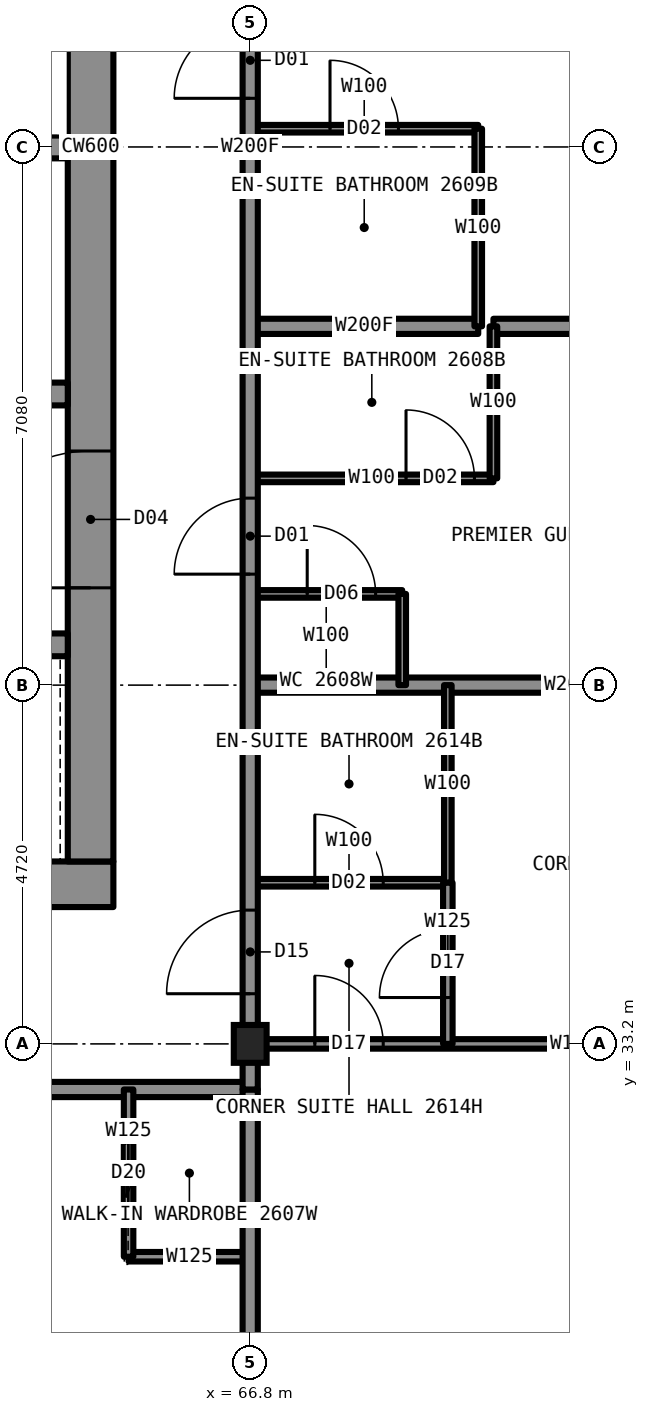
"""IFC4 building model, lengths in metres.
Left out: names, types, materials, properties, quantities, classifications, styles, units other than length and angle.
Written with IfcOpenShell. Run it as: python <this file> out.ifc"""

import sys

from ifc_helpers import new_model, si_unit, direction, frame, frame_2d, origin, origin_2d, place, context, subcontext, project, spatial, rectangle, i_section, extrude, element, fill, save


model = new_model("IFC4")
c1 = context("Model", 3, precision=1e-05, world=origin(), true_north=direction((0.0, 1.0)))
c2 = subcontext(c1, "Body", "Model", "MODEL_VIEW")
j1 = project(units=[si_unit("LENGTHUNIT", "METRE"), si_unit("PLANEANGLEUNIT", "RADIAN")], contexts=[c1])
p1 = place(None, origin())
s1 = spatial("IfcSite", under=j1, at=p1, CompositionType="ELEMENT")
p2 = place(p1, origin())
s2 = spatial("IfcBuilding", under=s1, at=p2, CompositionType="ELEMENT")
p3 = place(p2, frame((0.0, 0.0, 93.4)))
s3 = spatial("IfcBuildingStorey", under=s2, at=p3, CompositionType="ELEMENT", Elevation=93.4)
p4 = place(p3, frame((66.8, 33.2, 0.0), z_axis=(0.0, 0.0, 1.0), x_axis=(1.0, 0.0, 0.0)))
e1 = element("IfcColumn", 1, at=p4, inside=s3, PredefinedType="COLUMN", context=c2, shape_type="SweptSolid", body=[
    extrude(i_section(OverallWidth=0.432, OverallDepth=0.498, WebThickness=0.056, FlangeThickness=0.089, at=origin_2d()), origin(), (0.0, 0.0, 1.0), 3.5),
])
p5 = place(p3, frame((45.0, 35.3, 0.0), z_axis=(0.0, 0.0, 1.0), x_axis=(1.0, 0.0, 0.0)))
e2 = element("IfcWall", 2, at=p5, inside=s3, PredefinedType="SHEAR", context=c2, shape_type="SweptSolid", body=[
    extrude(rectangle(XDim=20.0, YDim=0.6, at=frame_2d((10.0, 0.0))), origin(), (0.0, 0.0, 1.0), 3.5),
])
p6 = place(p3, frame((64.7, 35.6, 0.0), z_axis=(0.0, 0.0, 1.0), x_axis=(0.0, 1.0, 0.0)))
e3 = element("IfcWall", 3, at=p6, inside=s3, PredefinedType="SHEAR", context=c2, shape_type="SweptSolid", body=[
    extrude(rectangle(XDim=18.8, YDim=0.6, at=frame_2d((9.4, 0.0))), origin(), (0.0, 0.0, 1.0), 3.5),
])
p7 = place(p6, frame((13.4, 0.0, 0.0)))
e4 = element("IfcOpeningElement", 4, at=p7, cuts=e3, PredefinedType="OPENING", context=c2, shape_type="SweptSolid", body=[
    extrude(rectangle(XDim=1.8, YDim=2.2, at=frame_2d((0.9, 1.1))), frame((0.0, 0.31, 0.0), z_axis=(0.0, -1.0, 0.0), x_axis=(1.0, 0.0, 0.0)), (0.0, 0.0, 1.0), 0.62),
])
p8 = place(p6, frame((3.6, 0.0, 0.0)))
e5 = element("IfcOpeningElement", 5, at=p8, cuts=e3, PredefinedType="OPENING", context=c2, shape_type="SweptSolid", body=[
    extrude(rectangle(XDim=1.8, YDim=2.2, at=frame_2d((0.9, 1.1))), frame((0.0, 0.31, 0.0), z_axis=(0.0, -1.0, 0.0), x_axis=(1.0, 0.0, 0.0)), (0.0, 0.0, 1.0), 0.62),
])
p9 = place(p3, frame((45.6, 38.45, 0.0), z_axis=(0.0, 0.0, 1.0), x_axis=(1.0, 0.0, 0.0)))
e6 = element("IfcWall", 6, at=p9, inside=s3, PredefinedType="SHEAR", context=c2, shape_type="SweptSolid", body=[
    extrude(rectangle(XDim=18.8, YDim=0.3, at=frame_2d((9.4, 0.0))), origin(), (0.0, 0.0, 1.0), 3.5),
])
p10 = place(p3, frame((56.2, 41.75, 0.0), z_axis=(0.0, 0.0, 1.0), x_axis=(1.0, 0.0, 0.0)))
e7 = element("IfcWall", 7, at=p10, inside=s3, PredefinedType="SHEAR", context=c2, shape_type="SweptSolid", body=[
    extrude(rectangle(XDim=8.2, YDim=0.3, at=frame_2d((4.1, 0.0))), origin(), (0.0, 0.0, 1.0), 3.5),
])
p11 = place(p10, frame((3.3, 0.0, 0.0)))
e8 = element("IfcOpeningElement", 8, at=p11, cuts=e7, PredefinedType="OPENING", context=c2, shape_type="SweptSolid", body=[
    extrude(rectangle(XDim=1.0, YDim=2.1, at=frame_2d((0.5, 1.05))), frame((0.0, 0.16, 0.0), z_axis=(0.0, -1.0, 0.0), x_axis=(1.0, 0.0, 0.0)), (0.0, 0.0, 1.0), 0.32),
])
p12 = place(p3, frame((56.5, 45.0, 0.0), z_axis=(0.0, 0.0, 1.0), x_axis=(1.0, 0.0, 0.0)))
e9 = element("IfcWall", 9, at=p12, inside=s3, PredefinedType="SHEAR", context=c2, shape_type="SweptSolid", body=[
    extrude(rectangle(XDim=7.9, YDim=0.3, at=frame_2d((3.95, 0.0))), origin(), (0.0, 0.0, 1.0), 3.5),
])
p13 = place(p3, frame((66.8, 33.2, 0.0), z_axis=(0.0, 0.0, 1.0), x_axis=(1.0, 0.0, 0.0)))
e10 = element("IfcWall", 10, at=p13, inside=s3, PredefinedType="PARTITIONING", context=c2, shape_type="SweptSolid", body=[
    extrude(rectangle(XDim=8.5, YDim=0.125, at=frame_2d((4.25, 0.0))), origin(), (0.0, 0.0, 1.0), 2.573),
])
p14 = place(p13, frame((0.85, 0.0, 0.0)))
e11 = element("IfcOpeningElement", 11, at=p14, cuts=e10, PredefinedType="OPENING", context=c2, shape_type="SweptSolid", body=[
    extrude(rectangle(XDim=0.9, YDim=2.2, at=frame_2d((0.45, 1.1))), frame((0.0, 0.073, 0.0), z_axis=(0.0, -1.0, 0.0), x_axis=(1.0, 0.0, 0.0)), (0.0, 0.0, 1.0), 0.145),
])
p15 = place(p3, frame((43.2, 32.6, 0.0), z_axis=(0.0, 0.0, 1.0), x_axis=(1.0, 0.0, 0.0)))
e12 = element("IfcWall", 12, at=p15, inside=s3, PredefinedType="PARTITIONING", context=c2, shape_type="SweptSolid", body=[
    extrude(rectangle(XDim=23.6, YDim=0.2, at=frame_2d((11.8, 0.0))), origin(), (0.0, 0.0, 1.0), 3.33),
])
p16 = place(p15, frame((3.0, 0.0, 0.0)))
e13 = element("IfcOpeningElement", 13, at=p16, cuts=e12, PredefinedType="OPENING", context=c2, shape_type="SweptSolid", body=[
    extrude(rectangle(XDim=1.0, YDim=2.2, at=frame_2d((0.5, 1.1))), frame((0.0, 0.11, 0.0), z_axis=(0.0, -1.0, 0.0), x_axis=(1.0, 0.0, 0.0)), (0.0, 0.0, 1.0), 0.22),
])
p17 = place(p15, frame((9.84, 0.0, 0.0)))
e14 = element("IfcOpeningElement", 14, at=p17, cuts=e12, PredefinedType="OPENING", context=c2, shape_type="SweptSolid", body=[
    extrude(rectangle(XDim=1.0, YDim=2.2, at=frame_2d((0.5, 1.1))), frame((0.0, 0.11, 0.0), z_axis=(0.0, -1.0, 0.0), x_axis=(1.0, 0.0, 0.0)), (0.0, 0.0, 1.0), 0.22),
])
p18 = place(p15, frame((17.16, 0.0, 0.0)))
e15 = element("IfcOpeningElement", 15, at=p18, cuts=e12, PredefinedType="OPENING", context=c2, shape_type="SweptSolid", body=[
    extrude(rectangle(XDim=1.0, YDim=2.2, at=frame_2d((0.5, 1.1))), frame((0.0, 0.11, 0.0), z_axis=(0.0, -1.0, 0.0), x_axis=(1.0, 0.0, 0.0)), (0.0, 0.0, 1.0), 0.22),
])
p19 = place(p3, frame((65.2, 30.4, 0.0), z_axis=(0.0, 0.0, 1.0), x_axis=(1.0, 0.0, 0.0)))
e16 = element("IfcWall", 16, at=p19, inside=s3, PredefinedType="PARTITIONING", context=c2, shape_type="SweptSolid", body=[
    extrude(rectangle(XDim=1.6, YDim=0.125, at=frame_2d((0.8, 0.0))), origin(), (0.0, 0.0, 1.0), 3.33),
])
p20 = place(p3, frame((66.8, 42.64, 0.0), z_axis=(0.0, 0.0, 1.0), x_axis=(1.0, 0.0, 0.0)))
e17 = element("IfcWall", 17, at=p20, inside=s3, PredefinedType="PARTITIONING", context=c2, shape_type="SweptSolid", body=[
    extrude(rectangle(XDim=3.0, YDim=0.2, at=frame_2d((1.5, 0.0))), origin(), (0.0, 0.0, 1.0), 2.731),
])
p21 = place(p3, frame((70.0, 42.64, 0.0), z_axis=(0.0, 0.0, 1.0), x_axis=(1.0, 0.0, 0.0)))
e18 = element("IfcWall", 18, at=p21, inside=s3, PredefinedType="PARTITIONING", context=c2, shape_type="SweptSolid", body=[
    extrude(rectangle(XDim=5.3, YDim=0.2, at=frame_2d((2.65, 0.0))), origin(), (0.0, 0.0, 1.0), 2.731),
])
p22 = place(p3, frame((66.8, 40.64, 0.0), z_axis=(0.0, 0.0, 1.0), x_axis=(1.0, 0.0, 0.0)))
e19 = element("IfcWall", 19, at=p22, inside=s3, PredefinedType="PARTITIONING", context=c2, shape_type="SweptSolid", body=[
    extrude(rectangle(XDim=3.2, YDim=0.1, at=frame_2d((1.6, 0.0))), origin(), (0.0, 0.0, 1.0), 3.33),
])
p23 = place(p22, frame((2.05, 0.0, 0.0)))
e20 = element("IfcOpeningElement", 20, at=p23, cuts=e19, PredefinedType="OPENING", context=c2, shape_type="SweptSolid", body=[
    extrude(rectangle(XDim=0.9, YDim=2.1, at=frame_2d((0.45, 1.05))), frame((0.0, 0.06, 0.0), z_axis=(0.0, -1.0, 0.0), x_axis=(1.0, 0.0, 0.0)), (0.0, 0.0, 1.0), 0.12),
])
p24 = place(p3, frame((66.8, 39.12, 0.0), z_axis=(0.0, 0.0, 1.0), x_axis=(1.0, 0.0, 0.0)))
e21 = element("IfcWall", 21, at=p24, inside=s3, PredefinedType="PARTITIONING", context=c2, shape_type="SweptSolid", body=[
    extrude(rectangle(XDim=2.0, YDim=0.1, at=frame_2d((1.0, 0.0))), origin(), (0.0, 0.0, 1.0), 3.33),
])
p25 = place(p24, frame((0.75, 0.0, 0.0)))
e22 = element("IfcOpeningElement", 22, at=p25, cuts=e21, PredefinedType="OPENING", context=c2, shape_type="SweptSolid", body=[
    extrude(rectangle(XDim=0.9, YDim=2.1, at=frame_2d((0.45, 1.05))), frame((0.0, 0.06, 0.0), z_axis=(0.0, -1.0, 0.0), x_axis=(1.0, 0.0, 0.0)), (0.0, 0.0, 1.0), 0.12),
])
p26 = place(p3, frame((66.8, 37.92, 0.0), z_axis=(0.0, 0.0, 1.0), x_axis=(1.0, 0.0, 0.0)))
e23 = element("IfcWall", 23, at=p26, inside=s3, PredefinedType="PARTITIONING", context=c2, shape_type="SweptSolid", body=[
    extrude(rectangle(XDim=8.5, YDim=0.2, at=frame_2d((4.25, 0.0))), origin(), (0.0, 0.0, 1.0), 2.573),
])
p27 = place(p3, frame((66.8, 35.32, 0.0), z_axis=(0.0, 0.0, 1.0), x_axis=(1.0, 0.0, 0.0)))
e24 = element("IfcWall", 24, at=p27, inside=s3, PredefinedType="PARTITIONING", context=c2, shape_type="SweptSolid", body=[
    extrude(rectangle(XDim=2.6, YDim=0.1, at=frame_2d((1.3, 0.0))), origin(), (0.0, 0.0, 1.0), 3.33),
])
p28 = place(p27, frame((0.85, 0.0, 0.0)))
e25 = element("IfcOpeningElement", 25, at=p28, cuts=e24, PredefinedType="OPENING", context=c2, shape_type="SweptSolid", body=[
    extrude(rectangle(XDim=0.9, YDim=2.1, at=frame_2d((0.45, 1.05))), frame((0.0, 0.06, 0.0), z_axis=(0.0, -1.0, 0.0), x_axis=(1.0, 0.0, 0.0)), (0.0, 0.0, 1.0), 0.12),
])
p29 = place(p3, frame((66.8, 45.24, 0.0), z_axis=(0.0, 0.0, 1.0), x_axis=(1.0, 0.0, 0.0)))
e26 = element("IfcWall", 26, at=p29, inside=s3, PredefinedType="PARTITIONING", context=c2, shape_type="SweptSolid", body=[
    extrude(rectangle(XDim=3.0, YDim=0.1, at=frame_2d((1.5, 0.0))), origin(), (0.0, 0.0, 1.0), 3.33),
])
p30 = place(p29, frame((1.05, 0.0, 0.0)))
e27 = element("IfcOpeningElement", 27, at=p30, cuts=e26, PredefinedType="OPENING", context=c2, shape_type="SweptSolid", body=[
    extrude(rectangle(XDim=0.9, YDim=2.1, at=frame_2d((0.45, 1.05))), frame((0.0, 0.06, 0.0), z_axis=(0.0, -1.0, 0.0), x_axis=(1.0, 0.0, 0.0)), (0.0, 0.0, 1.0), 0.12),
])
p31 = place(p3, frame((65.2, 30.4, 0.0), z_axis=(0.0, 0.0, 1.0), x_axis=(0.0, 1.0, 0.0)))
e28 = element("IfcWall", 28, at=p31, inside=s3, PredefinedType="PARTITIONING", context=c2, shape_type="SweptSolid", body=[
    extrude(rectangle(XDim=2.2, YDim=0.125, at=frame_2d((1.1, 0.0))), origin(), (0.0, 0.0, 1.0), 3.33),
])
p32 = place(p31, frame((0.7, 0.0, 0.0)))
e29 = element("IfcOpeningElement", 29, at=p32, cuts=e28, PredefinedType="OPENING", context=c2, shape_type="SweptSolid", body=[
    extrude(rectangle(XDim=0.8, YDim=2.1, at=frame_2d((0.4, 1.05))), frame((0.0, 0.073, 0.0), z_axis=(0.0, -1.0, 0.0), x_axis=(1.0, 0.0, 0.0)), (0.0, 0.0, 1.0), 0.145),
])
p33 = place(p3, frame((66.8, 33.22, 0.0), z_axis=(0.0, 0.0, 1.0), x_axis=(0.0, 1.0, 0.0)))
e30 = element("IfcWall", 30, at=p33, inside=s3, PredefinedType="PARTITIONING", context=c2, shape_type="SweptSolid", body=[
    extrude(rectangle(XDim=23.56, YDim=0.2, at=frame_2d((11.78, 0.0))), origin(), (0.0, 0.0, 1.0), 3.33),
])
p34 = place(p33, frame((6.16, 0.0, 0.0)))
e31 = element("IfcOpeningElement", 31, at=p34, cuts=e30, PredefinedType="OPENING", context=c2, shape_type="SweptSolid", body=[
    extrude(rectangle(XDim=1.0, YDim=2.2, at=frame_2d((0.5, 1.1))), frame((0.0, 0.11, 0.0), z_axis=(0.0, -1.0, 0.0), x_axis=(1.0, 0.0, 0.0)), (0.0, 0.0, 1.0), 0.22),
])
p35 = place(p33, frame((12.42, 0.0, 0.0)))
e32 = element("IfcOpeningElement", 32, at=p35, cuts=e30, PredefinedType="OPENING", context=c2, shape_type="SweptSolid", body=[
    extrude(rectangle(XDim=1.0, YDim=2.2, at=frame_2d((0.5, 1.1))), frame((0.0, 0.11, 0.0), z_axis=(0.0, -1.0, 0.0), x_axis=(1.0, 0.0, 0.0)), (0.0, 0.0, 1.0), 0.22),
])
p36 = place(p33, frame((21.82, 0.0, 0.0)))
e33 = element("IfcOpeningElement", 33, at=p36, cuts=e30, PredefinedType="OPENING", context=c2, shape_type="SweptSolid", body=[
    extrude(rectangle(XDim=1.1, YDim=2.2, at=frame_2d((0.55, 1.1))), frame((0.0, 0.11, 0.0), z_axis=(0.0, -1.0, 0.0), x_axis=(1.0, 0.0, 0.0)), (0.0, 0.0, 1.0), 0.22),
])
p37 = place(p33, frame((0.64, 0.0, 0.0)))
e34 = element("IfcOpeningElement", 34, at=p37, cuts=e30, PredefinedType="OPENING", context=c2, shape_type="SweptSolid", body=[
    extrude(rectangle(XDim=1.1, YDim=2.2, at=frame_2d((0.55, 1.1))), frame((0.0, 0.11, 0.0), z_axis=(0.0, -1.0, 0.0), x_axis=(1.0, 0.0, 0.0)), (0.0, 0.0, 1.0), 0.22),
])
p38 = place(p3, frame((66.8, 24.7, 0.0), z_axis=(0.0, 0.0, 1.0), x_axis=(0.0, 1.0, 0.0)))
e35 = element("IfcWall", 35, at=p38, inside=s3, PredefinedType="PARTITIONING", context=c2, shape_type="SweptSolid", body=[
    extrude(rectangle(XDim=7.9, YDim=0.2, at=frame_2d((3.95, 0.0))), origin(), (0.0, 0.0, 1.0), 2.573),
])
p39 = place(p3, frame((68.8, 37.92, 0.0), z_axis=(0.0, 0.0, 1.0), x_axis=(0.0, 1.0, 0.0)))
e36 = element("IfcWall", 36, at=p39, inside=s3, PredefinedType="PARTITIONING", context=c2, shape_type="SweptSolid", body=[
    extrude(rectangle(XDim=1.2, YDim=0.1, at=frame_2d((0.6, 0.0))), origin(), (0.0, 0.0, 1.0), 3.33),
])
p40 = place(p3, frame((69.4, 35.32, 0.0), z_axis=(0.0, 0.0, 1.0), x_axis=(0.0, 1.0, 0.0)))
e37 = element("IfcWall", 37, at=p40, inside=s3, PredefinedType="PARTITIONING", context=c2, shape_type="SweptSolid", body=[
    extrude(rectangle(XDim=2.6, YDim=0.1, at=frame_2d((1.3, 0.0))), origin(), (0.0, 0.0, 1.0), 3.33),
])
p41 = place(p3, frame((69.4, 33.2, 0.0), z_axis=(0.0, 0.0, 1.0), x_axis=(0.0, 1.0, 0.0)))
e38 = element("IfcWall", 38, at=p41, inside=s3, PredefinedType="PARTITIONING", context=c2, shape_type="SweptSolid", body=[
    extrude(rectangle(XDim=2.12, YDim=0.125, at=frame_2d((1.06, 0.0))), origin(), (0.0, 0.0, 1.0), 3.33),
])
p42 = place(p41, frame((0.61, 0.0, 0.0)))
e39 = element("IfcOpeningElement", 39, at=p42, cuts=e38, PredefinedType="OPENING", context=c2, shape_type="SweptSolid", body=[
    extrude(rectangle(XDim=0.9, YDim=2.2, at=frame_2d((0.45, 1.1))), frame((0.0, 0.073, 0.0), z_axis=(0.0, -1.0, 0.0), x_axis=(1.0, 0.0, 0.0)), (0.0, 0.0, 1.0), 0.145),
])
p43 = place(p3, frame((69.8, 42.64, 0.0), z_axis=(0.0, 0.0, 1.0), x_axis=(0.0, 1.0, 0.0)))
e40 = element("IfcWall", 40, at=p43, inside=s3, PredefinedType="PARTITIONING", context=c2, shape_type="SweptSolid", body=[
    extrude(rectangle(XDim=2.6, YDim=0.1, at=frame_2d((1.3, 0.0))), origin(), (0.0, 0.0, 1.0), 3.33),
])
p44 = place(p3, frame((70.0, 40.64, 0.0), z_axis=(0.0, 0.0, 1.0), x_axis=(0.0, 1.0, 0.0)))
e41 = element("IfcWall", 41, at=p44, inside=s3, PredefinedType="PARTITIONING", context=c2, shape_type="SweptSolid", body=[
    extrude(rectangle(XDim=2.0, YDim=0.1, at=frame_2d((1.0, 0.0))), origin(), (0.0, 0.0, 1.0), 3.33),
])
p45 = place(p3, frame((66.8, 32.6, 0.0), z_axis=(0.0, 0.0, 1.0), x_axis=(0.0, 1.0, 0.0)))
e42 = element("IfcWall", 42, at=p45, inside=s3, PredefinedType="PARTITIONING", context=c2, shape_type="SweptSolid", body=[
    extrude(rectangle(XDim=0.62, YDim=0.2, at=frame_2d((0.31, 0.0))), origin(), (0.0, 0.0, 1.0), 2.573),
])
p46 = place(p32, origin())
e43 = element("IfcDoor", 43, at=p46, inside=s3, OperationType="SLIDING_TO_LEFT", PredefinedType="DOOR", context=c2, shape_type="SweptSolid", body=[
    extrude(rectangle(XDim=0.8, YDim=2.1, at=frame_2d((0.4, 1.05))), frame((0.0, 0.025, 0.0), z_axis=(0.0, -1.0, 0.0), x_axis=(1.0, 0.0, 0.0)), (0.0, 0.0, 1.0), 0.05),
])
fill(e29, e43)
p47 = place(p34, origin())
e44 = element("IfcDoor", 44, at=p47, inside=s3, OperationType="SINGLE_SWING_LEFT", PredefinedType="DOOR", context=c2, shape_type="SweptSolid", body=[
    extrude(rectangle(XDim=1.0, YDim=2.2, at=frame_2d((0.5, 1.1))), frame((0.0, 0.025, 0.0), z_axis=(0.0, -1.0, 0.0), x_axis=(1.0, 0.0, 0.0)), (0.0, 0.0, 1.0), 0.05),
])
fill(e31, e44)
p48 = place(p23, origin())
e45 = element("IfcDoor", 45, at=p48, inside=s3, OperationType="SINGLE_SWING_RIGHT", PredefinedType="DOOR", context=c2, shape_type="SweptSolid", body=[
    extrude(rectangle(XDim=0.9, YDim=2.1, at=frame_2d((0.45, 1.05))), frame((0.0, 0.025, 0.0), z_axis=(0.0, -1.0, 0.0), x_axis=(1.0, 0.0, 0.0)), (0.0, 0.0, 1.0), 0.05),
])
fill(e20, e45)
p49 = place(p25, origin())
e46 = element("IfcDoor", 46, at=p49, inside=s3, OperationType="SINGLE_SWING_LEFT", PredefinedType="DOOR", context=c2, shape_type="SweptSolid", body=[
    extrude(rectangle(XDim=0.9, YDim=2.1, at=frame_2d((0.45, 1.05))), frame((0.0, 0.025, 0.0), z_axis=(0.0, -1.0, 0.0), x_axis=(1.0, 0.0, 0.0)), (0.0, 0.0, 1.0), 0.05),
])
fill(e22, e46)
p50 = place(p35, origin())
e47 = element("IfcDoor", 47, at=p50, inside=s3, OperationType="SINGLE_SWING_LEFT", PredefinedType="DOOR", context=c2, shape_type="SweptSolid", body=[
    extrude(rectangle(XDim=1.0, YDim=2.2, at=frame_2d((0.5, 1.1))), frame((0.0, 0.025, 0.0), z_axis=(0.0, -1.0, 0.0), x_axis=(1.0, 0.0, 0.0)), (0.0, 0.0, 1.0), 0.05),
])
fill(e32, e47)
p51 = place(p30, origin())
e48 = element("IfcDoor", 48, at=p51, inside=s3, OperationType="SINGLE_SWING_RIGHT", PredefinedType="DOOR", context=c2, shape_type="SweptSolid", body=[
    extrude(rectangle(XDim=0.9, YDim=2.1, at=frame_2d((0.45, 1.05))), frame((0.0, 0.025, 0.0), z_axis=(0.0, -1.0, 0.0), x_axis=(1.0, 0.0, 0.0)), (0.0, 0.0, 1.0), 0.05),
])
fill(e27, e48)
p52 = place(p14, origin())
e49 = element("IfcDoor", 49, at=p52, inside=s3, OperationType="SINGLE_SWING_LEFT", PredefinedType="DOOR", context=c2, shape_type="SweptSolid", body=[
    extrude(rectangle(XDim=0.9, YDim=2.2, at=frame_2d((0.45, 1.1))), frame((0.0, 0.025, 0.0), z_axis=(0.0, -1.0, 0.0), x_axis=(1.0, 0.0, 0.0)), (0.0, 0.0, 1.0), 0.05),
])
fill(e11, e49)
p53 = place(p28, origin())
e50 = element("IfcDoor", 50, at=p53, inside=s3, OperationType="SINGLE_SWING_RIGHT", PredefinedType="DOOR", context=c2, shape_type="SweptSolid", body=[
    extrude(rectangle(XDim=0.9, YDim=2.1, at=frame_2d((0.45, 1.05))), frame((0.0, 0.025, 0.0), z_axis=(0.0, -1.0, 0.0), x_axis=(1.0, 0.0, 0.0)), (0.0, 0.0, 1.0), 0.05),
])
fill(e25, e50)
p54 = place(p37, origin())
e51 = element("IfcDoor", 51, at=p54, inside=s3, OperationType="SINGLE_SWING_LEFT", PredefinedType="DOOR", context=c2, shape_type="SweptSolid", body=[
    extrude(rectangle(XDim=1.1, YDim=2.2, at=frame_2d((0.55, 1.1))), frame((0.0, 0.025, 0.0), z_axis=(0.0, -1.0, 0.0), x_axis=(1.0, 0.0, 0.0)), (0.0, 0.0, 1.0), 0.05),
])
fill(e34, e51)
p55 = place(p42, origin())
e52 = element("IfcDoor", 52, at=p55, inside=s3, OperationType="SINGLE_SWING_LEFT", PredefinedType="DOOR", context=c2, shape_type="SweptSolid", body=[
    extrude(rectangle(XDim=0.9, YDim=2.2, at=frame_2d((0.45, 1.1))), frame((0.0, 0.025, 0.0), z_axis=(0.0, -1.0, 0.0), x_axis=(1.0, 0.0, 0.0)), (0.0, 0.0, 1.0), 0.05),
])
fill(e39, e52)
p56 = place(p8, origin())
e53 = element("IfcDoor", 53, at=p56, inside=s3, OperationType="DOUBLE_DOOR_SINGLE_SWING", PredefinedType="DOOR", context=c2, shape_type="SweptSolid", body=[
    extrude(rectangle(XDim=1.8, YDim=2.2, at=frame_2d((0.9, 1.1))), frame((0.0, 0.025, 0.0), z_axis=(0.0, -1.0, 0.0), x_axis=(1.0, 0.0, 0.0)), (0.0, 0.0, 1.0), 0.05),
])
fill(e5, e53)
save(model, sys.argv[1])
